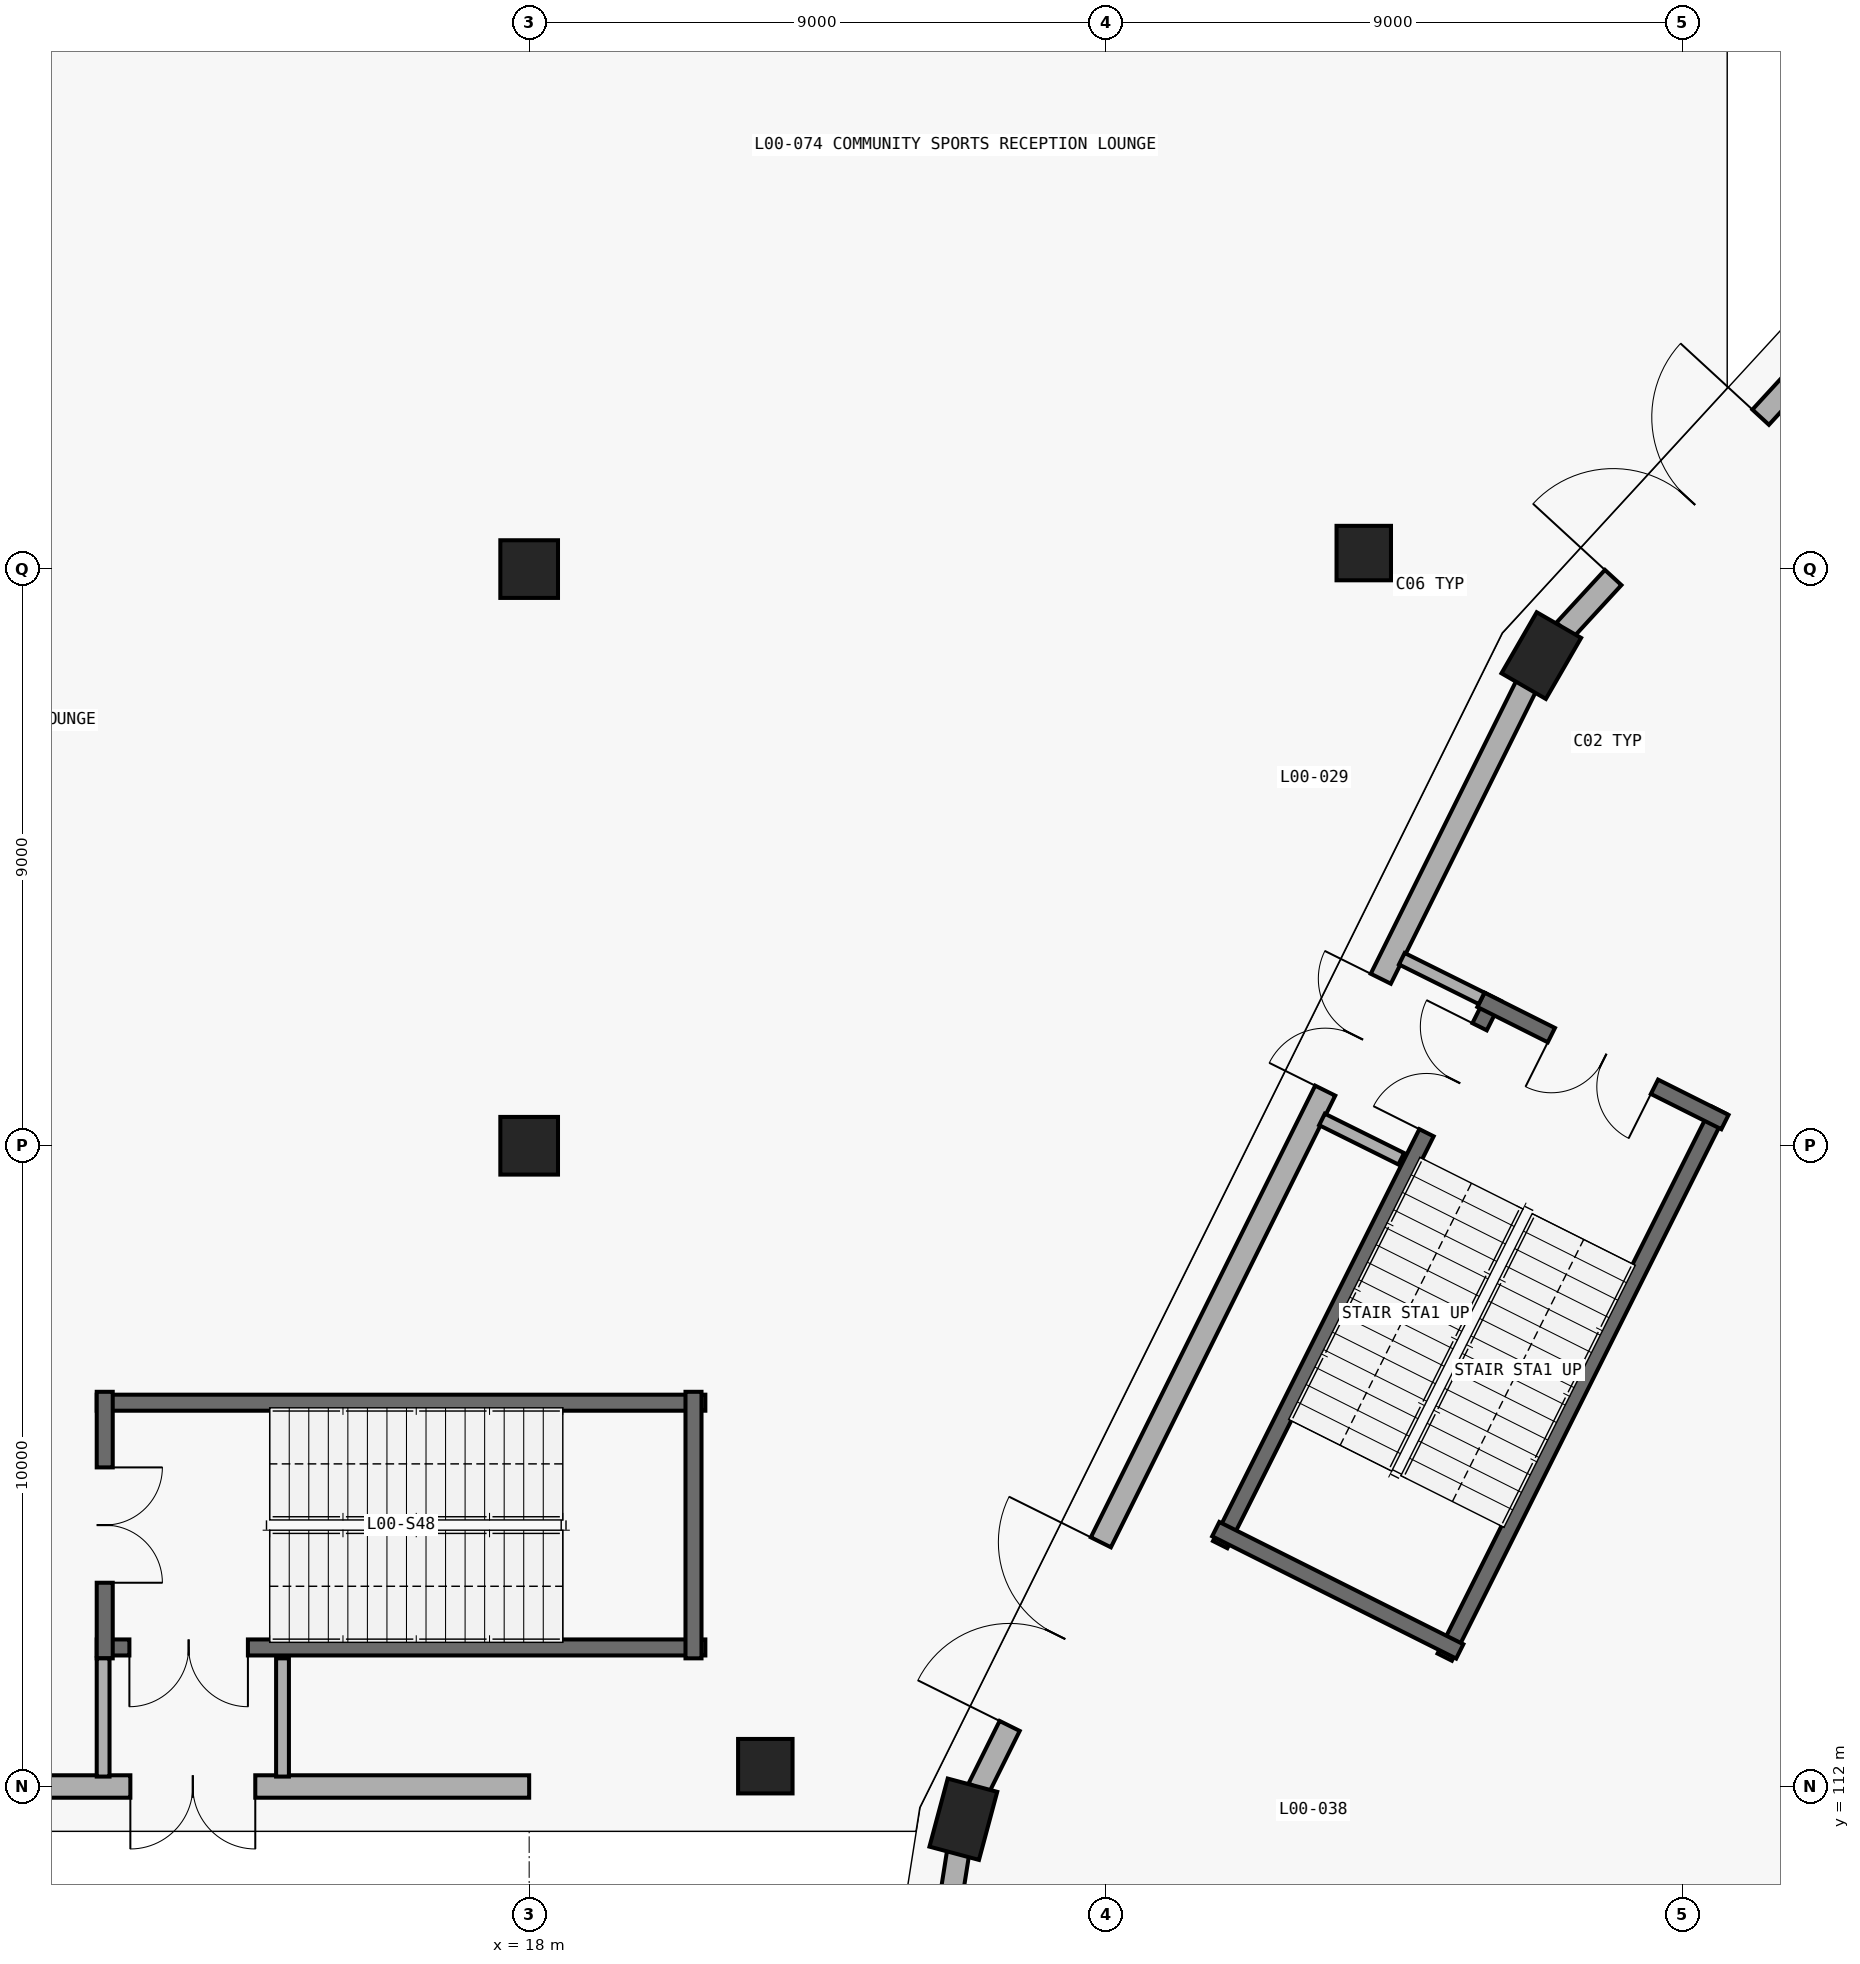
"""IFC4 building model, lengths in metres.
Left out: names, types, materials, properties, quantities, classifications, styles, units other than length and angle.
Written with IfcOpenShell. Run it as: python <this file> out.ifc"""

import sys

from ifc_helpers import new_model, si_unit, direction, frame, frame_2d, origin, origin_2d, place, context, subcontext, project, spatial, rectangle, circle, extrude, element, fill, save


model = new_model("IFC4")
c1 = context("Model", 3, precision=1e-05, world=origin(), true_north=direction((0.0, 1.0)))
c2 = subcontext(c1, "Body", "Model", "MODEL_VIEW")
j1 = project(units=[si_unit("LENGTHUNIT", "METRE"), si_unit("PLANEANGLEUNIT", "RADIAN")], contexts=[c1])
p1 = place(None, origin())
s1 = spatial("IfcSite", under=j1, at=p1, CompositionType="ELEMENT")
p2 = place(p1, origin())
s2 = spatial("IfcBuilding", under=s1, at=p2, CompositionType="ELEMENT")
p3 = place(p2, origin())
s3 = spatial("IfcBuildingStorey", under=s2, at=p3, CompositionType="ELEMENT", Elevation=0.0)
p4 = place(p3, frame((33.798, 129.65, 0.0), z_axis=(0.0, 0.0, 1.0), x_axis=(-0.866025403784, 0.5, 0.0)))
e1 = element("IfcColumn", 1, at=p4, inside=s3, PredefinedType="COLUMN", context=c2, shape_type="SweptSolid", body=[
    extrude(rectangle(XDim=0.8, YDim=1.1, at=origin_2d()), origin(), (0.0, 0.0, 1.0), 5.4),
])
p5 = place(p3, frame((31.027, 131.25, 0.0), z_axis=(0.0, 0.0, 1.0), x_axis=(1.0, 0.0, 0.0)))
e2 = element("IfcColumn", 2, at=p5, inside=s3, PredefinedType="COLUMN", context=c2, shape_type="SweptSolid", body=[
    extrude(circle(Radius=0.425, at=origin_2d()), origin(), (0.0, 0.0, 1.0), 5.4),
])
p6 = place(p3, frame((24.777, 111.489, 0.0), z_axis=(0.0, 0.0, 1.0), x_axis=(-0.965925826289, 0.258819045103, 0.0)))
e3 = element("IfcColumn", 3, at=p6, inside=s3, PredefinedType="COLUMN", context=c2, shape_type="SweptSolid", body=[
    extrude(rectangle(XDim=0.8, YDim=1.1, at=origin_2d()), origin(), (0.0, 0.0, 1.0), 5.4),
])
p7 = place(p3, frame((21.686, 112.317, 0.0), z_axis=(0.0, 0.0, 1.0), x_axis=(1.0, 0.0, 0.0)))
e4 = element("IfcColumn", 4, at=p7, inside=s3, PredefinedType="COLUMN", context=c2, shape_type="SweptSolid", body=[
    extrude(circle(Radius=0.425, at=origin_2d()), origin(), (0.0, 0.0, 1.0), 5.4),
])
for number, where, z_axis, x_axis in (
    (5, (18.0, 122.0, 0.0), (0.0, 0.0, 1.0), (1.0, 0.0, 0.0)),
    (6, (18.0, 131.0, 0.0), (0.0, 0.0, 1.0), (1.0, 0.0, 0.0)),
):
    element("IfcColumn", number, at=place(p3, frame(where, z_axis=z_axis, x_axis=x_axis)), inside=s3, PredefinedType="COLUMN", context=c2, shape_type="SweptSolid", body=[
        extrude(rectangle(XDim=0.9, YDim=0.9, at=origin_2d()), origin(), (0.0, 0.0, 1.0), 5.4),
    ])
p8 = place(p3, frame((34.163, 130.046, 0.0), z_axis=(0.0, 0.0, 1.0), x_axis=(0.677106454921, 0.735885078462, 0.0)))
e7 = element("IfcWall", 7, at=p8, inside=s3, PredefinedType="STANDARD", context=c2, shape_type="SweptSolid", body=[
    extrude(rectangle(XDim=20.128, YDim=0.35, at=frame_2d((10.064, 0.0))), origin(), (0.0, 0.0, 1.0), 4.165),
])
p9 = place(p8, frame((12.694, 0.0, 0.0)))
e8 = element("IfcOpeningElement", 8, at=p9, cuts=e7, PredefinedType="OPENING", context=c2, shape_type="SweptSolid", body=[
    extrude(rectangle(XDim=1.95, YDim=2.25, at=frame_2d((0.975, 1.125))), frame((0.0, 0.185, 0.0), z_axis=(0.0, -1.0, 0.0), x_axis=(1.0, 0.0, 0.0)), (0.0, 0.0, 1.0), 0.37),
])
p10 = place(p8, frame((1.118, 0.0, 0.0)))
e9 = element("IfcOpeningElement", 9, at=p10, cuts=e7, PredefinedType="OPENING", context=c2, shape_type="SweptSolid", body=[
    extrude(rectangle(XDim=3.4, YDim=2.65, at=frame_2d((1.7, 1.325))), frame((0.0, 0.185, 0.0), z_axis=(0.0, -1.0, 0.0), x_axis=(1.0, 0.0, 0.0)), (0.0, 0.0, 1.0), 0.37),
])
p11 = place(p3, frame((25.015, 111.969, 0.0), z_axis=(0.0, 0.0, 1.0), x_axis=(0.444884558919, 0.895587923788, 0.0)))
e10 = element("IfcWall", 10, at=p11, inside=s3, PredefinedType="STANDARD", context=c2, shape_type="SweptSolid", body=[
    extrude(rectangle(XDim=19.216, YDim=0.35, at=frame_2d((9.608, 0.0))), origin(), (0.0, 0.0, 1.0), 4.165),
])
p12 = place(p11, frame((12.161, 0.0, 0.0)))
e11 = element("IfcOpeningElement", 11, at=p12, cuts=e10, PredefinedType="OPENING", context=c2, shape_type="SweptSolid", body=[
    extrude(rectangle(XDim=1.95, YDim=2.25, at=frame_2d((0.975, 1.125))), frame((0.0, 0.185, 0.0), z_axis=(0.0, -1.0, 0.0), x_axis=(1.0, 0.0, 0.0)), (0.0, 0.0, 1.0), 0.37),
])
p13 = place(p11, frame((1.09, 0.0, 0.0)))
e12 = element("IfcOpeningElement", 12, at=p13, cuts=e10, PredefinedType="OPENING", context=c2, shape_type="SweptSolid", body=[
    extrude(rectangle(XDim=3.2, YDim=2.6, at=frame_2d((1.6, 1.3))), frame((0.0, 0.185, 0.0), z_axis=(0.0, -1.0, 0.0), x_axis=(1.0, 0.0, 0.0)), (0.0, 0.0, 1.0), 0.37),
])
p14 = place(p3, frame((21.783, 92.525, 0.0), z_axis=(0.0, 0.0, 1.0), x_axis=(0.155972645656, 0.987761374932, 0.0)))
e13 = element("IfcWall", 13, at=p14, inside=s3, PredefinedType="STANDARD", context=c2, shape_type="SweptSolid", body=[
    extrude(rectangle(XDim=18.671, YDim=0.35, at=frame_2d((9.335, 0.0))), origin(), (0.0, 0.0, 1.0), 4.165),
])
p15 = place(p14, frame((11.73, 0.0, 0.0)))
e14 = element("IfcOpeningElement", 14, at=p15, cuts=e13, PredefinedType="OPENING", context=c2, shape_type="SweptSolid", body=[
    extrude(rectangle(XDim=1.95, YDim=2.25, at=frame_2d((0.975, 1.125))), frame((0.0, 0.185, 0.0), z_axis=(0.0, -1.0, 0.0), x_axis=(1.0, 0.0, 0.0)), (0.0, 0.0, 1.0), 0.37),
])
p16 = place(p14, frame((1.114, 0.0, 0.0)))
e15 = element("IfcOpeningElement", 15, at=p16, cuts=e13, PredefinedType="OPENING", context=c2, shape_type="SweptSolid", body=[
    extrude(rectangle(XDim=3.0, YDim=2.55, at=frame_2d((1.5, 1.275))), frame((0.0, 0.185, 0.0), z_axis=(0.0, -1.0, 0.0), x_axis=(1.0, 0.0, 0.0)), (0.0, 0.0, 1.0), 0.37),
])
p17 = place(p3, frame((18.0, 112.0, 0.0), z_axis=(0.0, 0.0, 1.0), x_axis=(-1.0, 0.0, 0.0)))
e16 = element("IfcWall", 16, at=p17, inside=s3, PredefinedType="STANDARD", context=c2, shape_type="SweptSolid", body=[
    extrude(rectangle(XDim=8.575, YDim=0.35, at=frame_2d((4.288, 0.0))), origin(), (0.0, 0.0, 1.0), 5.1),
])
p18 = place(p17, frame((4.275, 0.0, 0.0)))
e17 = element("IfcOpeningElement", 17, at=p18, cuts=e16, PredefinedType="OPENING", context=c2, shape_type="SweptSolid", body=[
    extrude(rectangle(XDim=1.95, YDim=2.25, at=frame_2d((0.975, 1.125))), frame((0.0, 0.185, 0.0), z_axis=(0.0, -1.0, 0.0), x_axis=(1.0, 0.0, 0.0)), (0.0, 0.0, 1.0), 0.37),
])
p19 = place(p3, frame((28.786, 115.775, 0.0), z_axis=(0.0, 0.0, 1.0), x_axis=(0.447919041961, 0.894074119885, 0.0)))
e18 = element("IfcWall", 18, at=p19, inside=s3, PredefinedType="SHEAR", context=c2, shape_type="SweptSolid", body=[
    extrude(rectangle(XDim=9.55, YDim=0.25, at=frame_2d((4.775, 0.0))), origin(), (0.0, 0.0, 1.0), 5.1),
])
p20 = place(p19, frame((7.19, 0.0, 0.0)))
e19 = element("IfcOpeningElement", 19, at=p20, cuts=e18, PredefinedType="OPENING", context=c2, shape_type="SweptSolid", body=[
    extrude(rectangle(XDim=1.85, YDim=2.3, at=frame_2d((0.925, 1.15))), frame((0.0, 0.135, 0.0), z_axis=(0.0, -1.0, 0.0), x_axis=(1.0, 0.0, 0.0)), (0.0, 0.0, 1.0), 0.27),
])
p21 = place(p3, frame((32.291, 114.019, 0.0), z_axis=(0.0, 0.0, 1.0), x_axis=(0.4479088042, 0.894079248792, 0.0)))
e20 = element("IfcWall", 20, at=p21, inside=s3, PredefinedType="SHEAR", context=c2, shape_type="SweptSolid", body=[
    extrude(rectangle(XDim=9.55, YDim=0.25, at=frame_2d((4.775, 0.0))), origin(), (0.0, 0.0, 1.0), 5.1),
])
p22 = place(p3, frame((36.664, 122.37, 0.0), z_axis=(0.0, 0.0, 1.0), x_axis=(-0.894071595331, 0.447924081092, 0.0)))
e21 = element("IfcWall", 21, at=p22, inside=s3, PredefinedType="SHEAR", context=c2, shape_type="SweptSolid", body=[
    extrude(rectangle(XDim=4.26, YDim=0.25, at=frame_2d((2.13, 0.0))), origin(), (0.0, 0.0, 1.0), 5.1),
])
p23 = place(p22, frame((1.23, 0.0, 0.0)))
e22 = element("IfcOpeningElement", 22, at=p23, cuts=e21, PredefinedType="OPENING", context=c2, shape_type="SweptSolid", body=[
    extrude(rectangle(XDim=1.8, YDim=2.25, at=frame_2d((0.9, 1.125))), frame((0.0, 0.135, 0.0), z_axis=(0.0, -1.0, 0.0), x_axis=(1.0, 0.0, 0.0)), (0.0, 0.0, 1.0), 0.27),
])
p24 = place(p3, frame((28.717, 116.016, 0.0), z_axis=(0.0, 0.0, 1.0), x_axis=(0.894083048484, -0.447901219481, 0.0)))
e23 = element("IfcWall", 23, at=p24, inside=s3, PredefinedType="SHEAR", context=c2, shape_type="SweptSolid", body=[
    extrude(rectangle(XDim=4.26, YDim=0.25, at=frame_2d((2.13, 0.0))), origin(), (0.0, 0.0, 1.0), 5.1),
])
p25 = place(p3, frame((20.75, 114.17, 0.0), z_axis=(0.0, 0.0, 1.0), x_axis=(-1.0, 0.0, 0.0)))
e24 = element("IfcWall", 24, at=p25, inside=s3, PredefinedType="SHEAR", context=c2, shape_type="SweptSolid", body=[
    extrude(rectangle(XDim=9.5, YDim=0.25, at=frame_2d((4.75, 0.0))), origin(), (0.0, 0.0, 1.0), 5.1),
])
p26 = place(p25, frame((7.14, 0.0, 0.0)))
e25 = element("IfcOpeningElement", 25, at=p26, cuts=e24, PredefinedType="OPENING", context=c2, shape_type="SweptSolid", body=[
    extrude(rectangle(XDim=1.85, YDim=2.3, at=frame_2d((0.925, 1.15))), frame((0.0, 0.135, 0.0), z_axis=(0.0, -1.0, 0.0), x_axis=(1.0, 0.0, 0.0)), (0.0, 0.0, 1.0), 0.27),
])
p27 = place(p3, frame((20.75, 117.99, 0.0), z_axis=(0.0, 0.0, 1.0), x_axis=(-1.0, 0.0, 0.0)))
e26 = element("IfcWall", 26, at=p27, inside=s3, PredefinedType="SHEAR", context=c2, shape_type="SweptSolid", body=[
    extrude(rectangle(XDim=9.5, YDim=0.25, at=frame_2d((4.75, 0.0))), origin(), (0.0, 0.0, 1.0), 5.1),
])
p28 = place(p3, frame((11.375, 118.16, 0.0), z_axis=(0.0, 0.0, 1.0), x_axis=(0.0, -1.0, 0.0)))
e27 = element("IfcWall", 27, at=p28, inside=s3, PredefinedType="SHEAR", context=c2, shape_type="SweptSolid", body=[
    extrude(rectangle(XDim=4.16, YDim=0.25, at=frame_2d((2.08, 0.0))), origin(), (0.0, 0.0, 1.0), 5.1),
])
p29 = place(p28, frame((1.18, 0.0, 0.0)))
e28 = element("IfcOpeningElement", 28, at=p29, cuts=e27, PredefinedType="OPENING", context=c2, shape_type="SweptSolid", body=[
    extrude(rectangle(XDim=1.8, YDim=2.25, at=frame_2d((0.9, 1.125))), frame((0.0, 0.135, 0.0), z_axis=(0.0, -1.0, 0.0), x_axis=(1.0, 0.0, 0.0)), (0.0, 0.0, 1.0), 0.27),
])
p30 = place(p3, frame((20.565, 114.0, 0.0), z_axis=(0.0, 0.0, 1.0), x_axis=(0.0, 1.0, 0.0)))
e29 = element("IfcWall", 29, at=p30, inside=s3, PredefinedType="SHEAR", context=c2, shape_type="SweptSolid", body=[
    extrude(rectangle(XDim=4.16, YDim=0.25, at=frame_2d((2.08, 0.0))), origin(), (0.0, 0.0, 1.0), 5.1),
])
p31 = place(p3, frame((32.867, 124.3, 0.0), z_axis=(0.0, 0.0, 1.0), x_axis=(-0.895547753185, 0.444965416371, 0.0)))
e30 = element("IfcWall", 30, at=p31, inside=s3, PredefinedType="PARTITIONING", context=c2, shape_type="SweptSolid", body=[
    extrude(rectangle(XDim=1.391, YDim=0.2, at=frame_2d((0.695, 0.0))), origin(), (0.0, 0.0, 1.0), 4.165),
])
p32 = place(p3, frame((31.613, 121.797, 0.0), z_axis=(0.0, 0.0, 1.0), x_axis=(-0.895731004012, 0.44459641075, 0.0)))
e31 = element("IfcWall", 31, at=p32, inside=s3, PredefinedType="PARTITIONING", context=c2, shape_type="SweptSolid", body=[
    extrude(rectangle(XDim=1.382, YDim=0.2, at=frame_2d((0.691, 0.0))), origin(), (0.0, 0.0, 1.0), 4.165),
])
for number, where, z_axis, x_axis in (
    (32, (11.35, 114.0, 0.0), (0.0, 0.0, 1.0), (0.0, -1.0, 0.0)),
    (33, (14.15, 114.0, 0.0), (0.0, 0.0, 1.0), (0.0, -1.0, 0.0)),
):
    element("IfcWall", number, at=place(p3, frame(where, z_axis=z_axis, x_axis=x_axis)), inside=s3, PredefinedType="PARTITIONING", context=c2, shape_type="SweptSolid", body=[
        extrude(rectangle(XDim=1.845, YDim=0.2, at=frame_2d((0.922, 0.0))), origin(), (0.0, 0.0, 1.0), 5.08),
    ])
p33 = place(p10, origin())
e34 = element("IfcDoor", 34, at=p33, inside=s3, OperationType="DOUBLE_DOOR_SINGLE_SWING", PredefinedType="DOOR", context=c2, shape_type="SweptSolid", body=[
    extrude(rectangle(XDim=3.4, YDim=2.65, at=frame_2d((1.7, 1.325))), frame((0.0, 0.025, 0.0), z_axis=(0.0, -1.0, 0.0), x_axis=(1.0, 0.0, 0.0)), (0.0, 0.0, 1.0), 0.05),
])
fill(e9, e34)
p34 = place(p12, origin())
e35 = element("IfcDoor", 35, at=p34, inside=s3, OperationType="DOUBLE_DOOR_SINGLE_SWING", PredefinedType="DOOR", context=c2, shape_type="SweptSolid", body=[
    extrude(rectangle(XDim=1.95, YDim=2.25, at=frame_2d((0.975, 1.125))), frame((0.0, 0.025, 0.0), z_axis=(0.0, -1.0, 0.0), x_axis=(1.0, 0.0, 0.0)), (0.0, 0.0, 1.0), 0.05),
])
fill(e11, e35)
p35 = place(p13, origin())
e36 = element("IfcDoor", 36, at=p35, inside=s3, OperationType="DOUBLE_DOOR_SINGLE_SWING", PredefinedType="DOOR", context=c2, shape_type="SweptSolid", body=[
    extrude(rectangle(XDim=3.2, YDim=2.6, at=frame_2d((1.6, 1.3))), frame((0.0, 0.025, 0.0), z_axis=(0.0, -1.0, 0.0), x_axis=(1.0, 0.0, 0.0)), (0.0, 0.0, 1.0), 0.05),
])
fill(e12, e36)
p36 = place(p18, origin())
e37 = element("IfcDoor", 37, at=p36, inside=s3, OperationType="DOUBLE_DOOR_SINGLE_SWING", PredefinedType="DOOR", context=c2, shape_type="SweptSolid", body=[
    extrude(rectangle(XDim=1.95, YDim=2.25, at=frame_2d((0.975, 1.125))), frame((0.0, 0.025, 0.0), z_axis=(0.0, -1.0, 0.0), x_axis=(1.0, 0.0, 0.0)), (0.0, 0.0, 1.0), 0.05),
])
fill(e17, e37)
p37 = place(p23, origin())
e38 = element("IfcDoor", 38, at=p37, inside=s3, OperationType="DOUBLE_DOOR_SINGLE_SWING", PredefinedType="DOOR", context=c2, shape_type="SweptSolid", body=[
    extrude(rectangle(XDim=1.8, YDim=2.25, at=frame_2d((0.9, 1.125))), frame((0.0, 0.025, 0.0), z_axis=(0.0, -1.0, 0.0), x_axis=(1.0, 0.0, 0.0)), (0.0, 0.0, 1.0), 0.05),
])
fill(e22, e38)
p38 = place(p20, origin())
e39 = element("IfcDoor", 39, at=p38, inside=s3, OperationType="DOUBLE_DOOR_SINGLE_SWING", PredefinedType="DOOR", context=c2, shape_type="SweptSolid", body=[
    extrude(rectangle(XDim=1.85, YDim=2.3, at=frame_2d((0.925, 1.15))), frame((0.0, 0.025, 0.0), z_axis=(0.0, -1.0, 0.0), x_axis=(1.0, 0.0, 0.0)), (0.0, 0.0, 1.0), 0.05),
])
fill(e19, e39)
p39 = place(p29, origin())
e40 = element("IfcDoor", 40, at=p39, inside=s3, OperationType="DOUBLE_DOOR_SINGLE_SWING", PredefinedType="DOOR", context=c2, shape_type="SweptSolid", body=[
    extrude(rectangle(XDim=1.8, YDim=2.25, at=frame_2d((0.9, 1.125))), frame((0.0, 0.025, 0.0), z_axis=(0.0, -1.0, 0.0), x_axis=(1.0, 0.0, 0.0)), (0.0, 0.0, 1.0), 0.05),
])
fill(e28, e40)
p40 = place(p26, origin())
e41 = element("IfcDoor", 41, at=p40, inside=s3, OperationType="DOUBLE_DOOR_SINGLE_SWING", PredefinedType="DOOR", context=c2, shape_type="SweptSolid", body=[
    extrude(rectangle(XDim=1.85, YDim=2.3, at=frame_2d((0.925, 1.15))), frame((0.0, 0.025, 0.0), z_axis=(0.0, -1.0, 0.0), x_axis=(1.0, 0.0, 0.0)), (0.0, 0.0, 1.0), 0.05),
])
fill(e25, e41)
save(model, sys.argv[1])
